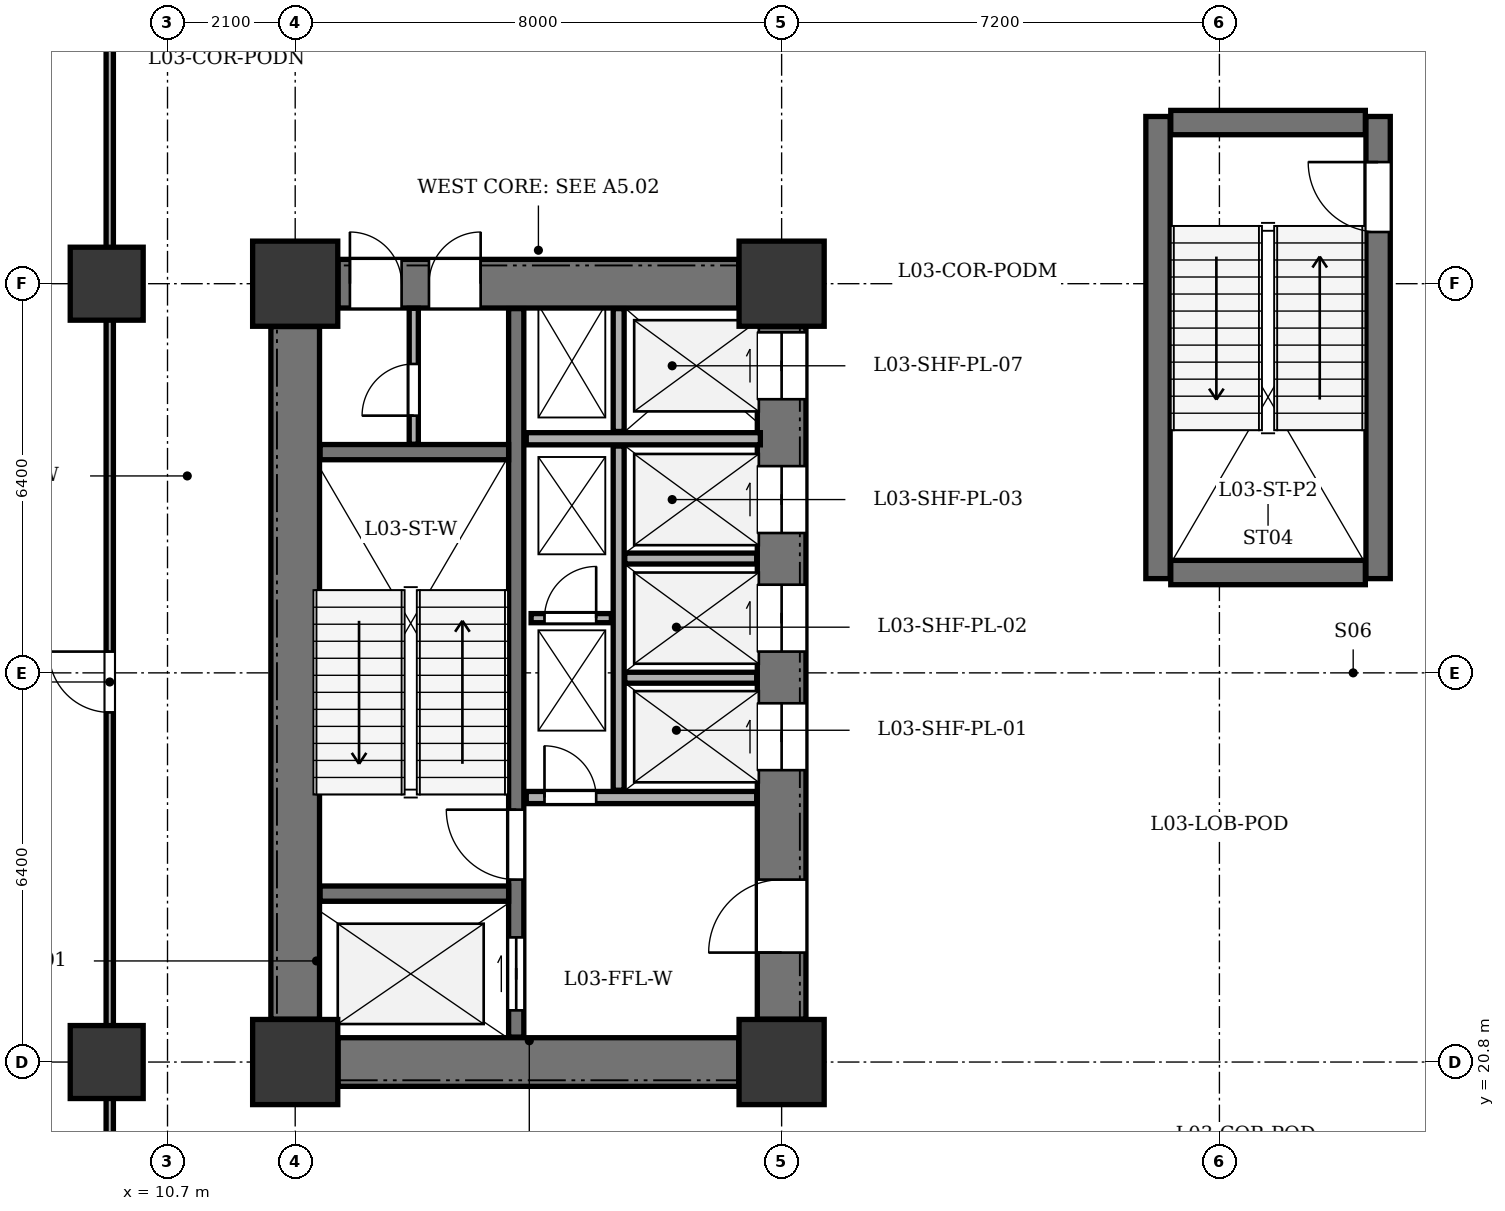
"""IFC4 building model, lengths in metres.
Left out: names, types, materials, properties, quantities, classifications, styles, units other than length and angle.
Written with IfcOpenShell. Run it as: python <this file> out.ifc"""

import sys

from ifc_helpers import new_model, si_unit, direction, frame, frame_2d, origin, origin_2d, place, context, subcontext, project, spatial, rectangle, extrude, element, fill, save


model = new_model("IFC4")
c1 = context("Model", 3, precision=1e-05, world=origin(), true_north=direction((0.0, 1.0)))
c2 = subcontext(c1, "Body", "Model", "MODEL_VIEW")
j1 = project(units=[si_unit("LENGTHUNIT", "METRE"), si_unit("PLANEANGLEUNIT", "RADIAN")], contexts=[c1])
p1 = place(None, origin())
s1 = spatial("IfcSite", under=j1, at=p1, CompositionType="ELEMENT")
p2 = place(p1, origin())
s2 = spatial("IfcBuilding", under=s1, at=p2, CompositionType="ELEMENT")
p3 = place(p2, frame((0.0, 0.0, 14.4)))
s3 = spatial("IfcBuildingStorey", under=s2, at=p3, CompositionType="ELEMENT", Elevation=14.4)
for number, where, z_axis, x_axis in (
    (1, (12.8, 20.8, 0.0), (0.0, 0.0, 1.0), (1.0, 0.0, 0.0)),
    (2, (20.8, 20.8, 0.0), (0.0, 0.0, 1.0), (1.0, 0.0, 0.0)),
    (3, (12.8, 33.6, 0.0), (0.0, 0.0, 1.0), (1.0, 0.0, 0.0)),
    (4, (20.8, 33.6, 0.0), (0.0, 0.0, 1.0), (1.0, 0.0, 0.0)),
):
    element("IfcColumn", number, at=place(p3, frame(where, z_axis=z_axis, x_axis=x_axis)), inside=s3, PredefinedType="COLUMN", context=c2, shape_type="SweptSolid", body=[
        extrude(rectangle(XDim=1.4, YDim=1.4, at=origin_2d()), origin(), (0.0, 0.0, 1.0), 4.5),
    ])
for number, where, z_axis, x_axis in (
    (5, (9.7, 20.8, 0.0), (0.0, 0.0, 1.0), (1.0, 0.0, 0.0)),
    (6, (9.7, 33.6, 0.0), (0.0, 0.0, 1.0), (1.0, 0.0, 0.0)),
):
    element("IfcColumn", number, at=place(p3, frame(where, z_axis=z_axis, x_axis=x_axis)), inside=s3, PredefinedType="COLUMN", context=c2, shape_type="SweptSolid", body=[
        extrude(rectangle(XDim=1.2, YDim=1.2, at=origin_2d()), origin(), (0.0, 0.0, 1.0), 4.5),
    ])
p4 = place(p3, frame((12.8, 21.505, 0.0), z_axis=(0.0, 0.0, 1.0), x_axis=(0.0, 1.0, 0.0)))
e7 = element("IfcWall", 7, at=p4, inside=s3, PredefinedType="SHEAR", context=c2, shape_type="SweptSolid", body=[
    extrude(rectangle(XDim=11.39, YDim=0.8, at=frame_2d((5.695, 0.0))), origin(), (0.0, 0.0, 1.0), 4.0),
])
p5 = place(p3, frame((13.505, 20.8, 0.0), z_axis=(0.0, 0.0, 1.0), x_axis=(1.0, 0.0, 0.0)))
e8 = element("IfcWall", 8, at=p5, inside=s3, PredefinedType="SHEAR", context=c2, shape_type="SweptSolid", body=[
    extrude(rectangle(XDim=6.59, YDim=0.8, at=frame_2d((3.295, 0.0))), origin(), (0.0, 0.0, 1.0), 4.0),
])
p6 = place(p3, frame((13.505, 33.6, 0.0), z_axis=(0.0, 0.0, 1.0), x_axis=(1.0, 0.0, 0.0)))
e9 = element("IfcWall", 9, at=p6, inside=s3, PredefinedType="SHEAR", context=c2, shape_type="SweptSolid", body=[
    extrude(rectangle(XDim=6.59, YDim=0.8, at=frame_2d((3.295, 0.0))), origin(), (0.0, 0.0, 1.0), 4.0),
])
p7 = place(p6, frame((0.195, 0.0, 0.0)))
e10 = element("IfcOpeningElement", 10, at=p7, cuts=e9, PredefinedType="OPENING", context=c2, shape_type="SweptSolid", body=[
    extrude(rectangle(XDim=0.85, YDim=2.02, at=frame_2d((0.425, 1.01))), frame((0.0, 0.41, 0.0), z_axis=(0.0, -1.0, 0.0), x_axis=(1.0, 0.0, 0.0)), (0.0, 0.0, 1.0), 0.82),
])
p8 = place(p6, frame((1.495, 0.0, 0.0)))
e11 = element("IfcOpeningElement", 11, at=p8, cuts=e9, PredefinedType="OPENING", context=c2, shape_type="SweptSolid", body=[
    extrude(rectangle(XDim=0.85, YDim=2.02, at=frame_2d((0.425, 1.01))), frame((0.0, 0.41, 0.0), z_axis=(0.0, -1.0, 0.0), x_axis=(1.0, 0.0, 0.0)), (0.0, 0.0, 1.0), 0.82),
])
p9 = place(p3, frame((20.8, 21.505, 0.0), z_axis=(0.0, 0.0, 1.0), x_axis=(0.0, 1.0, 0.0)))
e12 = element("IfcWall", 12, at=p9, inside=s3, PredefinedType="SHEAR", context=c2, shape_type="SweptSolid", body=[
    extrude(rectangle(XDim=11.39, YDim=0.8, at=frame_2d((5.695, 0.0))), origin(), (0.0, 0.0, 1.0), 4.0),
])
p10 = place(p9, frame((1.095, 0.0, 0.0)))
e13 = element("IfcOpeningElement", 13, at=p10, cuts=e12, PredefinedType="OPENING", context=c2, shape_type="SweptSolid", body=[
    extrude(rectangle(XDim=1.2, YDim=2.15, at=frame_2d((0.6, 1.075))), frame((0.0, 0.41, 0.0), z_axis=(0.0, -1.0, 0.0), x_axis=(1.0, 0.0, 0.0)), (0.0, 0.0, 1.0), 0.82),
])
p11 = place(p9, frame((4.095, 0.0, 0.0)))
e14 = element("IfcOpeningElement", 14, at=p11, cuts=e12, PredefinedType="OPENING", context=c2, shape_type="SweptSolid", body=[
    extrude(rectangle(XDim=1.1, YDim=2.1, at=frame_2d((0.55, 1.05))), frame((0.0, 0.41, 0.0), z_axis=(0.0, -1.0, 0.0), x_axis=(1.0, 0.0, 0.0)), (0.0, 0.0, 1.0), 0.82),
])
p12 = place(p9, frame((6.045, 0.0, 0.0)))
e15 = element("IfcOpeningElement", 15, at=p12, cuts=e12, PredefinedType="OPENING", context=c2, shape_type="SweptSolid", body=[
    extrude(rectangle(XDim=1.1, YDim=2.1, at=frame_2d((0.55, 1.05))), frame((0.0, 0.41, 0.0), z_axis=(0.0, -1.0, 0.0), x_axis=(1.0, 0.0, 0.0)), (0.0, 0.0, 1.0), 0.82),
])
p13 = place(p9, frame((7.995, 0.0, 0.0)))
e16 = element("IfcOpeningElement", 16, at=p13, cuts=e12, PredefinedType="OPENING", context=c2, shape_type="SweptSolid", body=[
    extrude(rectangle(XDim=1.1, YDim=2.1, at=frame_2d((0.55, 1.05))), frame((0.0, 0.41, 0.0), z_axis=(0.0, -1.0, 0.0), x_axis=(1.0, 0.0, 0.0)), (0.0, 0.0, 1.0), 0.82),
])
p14 = place(p9, frame((10.195, 0.0, 0.0)))
e17 = element("IfcOpeningElement", 17, at=p14, cuts=e12, PredefinedType="OPENING", context=c2, shape_type="SweptSolid", body=[
    extrude(rectangle(XDim=1.1, YDim=2.1, at=frame_2d((0.55, 1.05))), frame((0.0, 0.41, 0.0), z_axis=(0.0, -1.0, 0.0), x_axis=(1.0, 0.0, 0.0)), (0.0, 0.0, 1.0), 0.82),
])
p15 = place(p3, frame((16.435, 21.21, 0.0), z_axis=(0.0, 0.0, 1.0), x_axis=(0.0, 1.0, 0.0)))
e18 = element("IfcWall", 18, at=p15, inside=s3, PredefinedType="SHEAR", context=c2, shape_type="SweptSolid", body=[
    extrude(rectangle(XDim=11.98, YDim=0.25, at=frame_2d((5.99, 0.0))), origin(), (0.0, 0.0, 1.0), 4.0),
])
p16 = place(p15, frame((0.44, 0.0, 0.0)))
e19 = element("IfcOpeningElement", 19, at=p16, cuts=e18, PredefinedType="OPENING", context=c2, shape_type="SweptSolid", body=[
    extrude(rectangle(XDim=1.2, YDim=2.15, at=frame_2d((0.6, 1.075))), frame((0.0, 0.135, 0.0), z_axis=(0.0, -1.0, 0.0), x_axis=(1.0, 0.0, 0.0)), (0.0, 0.0, 1.0), 0.27),
])
p17 = place(p15, frame((2.59, 0.0, 0.0)))
e20 = element("IfcOpeningElement", 20, at=p17, cuts=e18, PredefinedType="OPENING", context=c2, shape_type="SweptSolid", body=[
    extrude(rectangle(XDim=1.15, YDim=2.15, at=frame_2d((0.575, 1.075))), frame((0.0, 0.135, 0.0), z_axis=(0.0, -1.0, 0.0), x_axis=(1.0, 0.0, 0.0)), (0.0, 0.0, 1.0), 0.27),
])
for number, where, z_axis, x_axis in (
    (21, (13.21, 23.57, 0.0), (0.0, 0.0, 1.0), (1.0, 0.0, 0.0)),
    (22, (13.21, 30.83, 0.0), (0.0, 0.0, 1.0), (1.0, 0.0, 0.0)),
):
    element("IfcWall", number, at=place(p3, frame(where, z_axis=z_axis, x_axis=x_axis)), inside=s3, PredefinedType="SHEAR", context=c2, shape_type="SweptSolid", body=[
        extrude(rectangle(XDim=3.1, YDim=0.25, at=frame_2d((1.55, 0.0))), origin(), (0.0, 0.0, 1.0), 4.0),
    ])
p18 = place(p3, frame((16.6, 25.15, 0.0), z_axis=(0.0, 0.0, 1.0), x_axis=(1.0, 0.0, 0.0)))
e23 = element("IfcWall", 23, at=p18, inside=s3, PredefinedType="SOLIDWALL", context=c2, shape_type="SweptSolid", body=[
    extrude(rectangle(XDim=3.79, YDim=0.2, at=frame_2d((1.895, 0.0))), origin(), (0.0, 0.0, 1.0), 4.0),
])
p19 = place(p18, frame((0.3, 0.0, 0.0)))
e24 = element("IfcOpeningElement", 24, at=p19, cuts=e23, PredefinedType="OPENING", context=c2, shape_type="SweptSolid", body=[
    extrude(rectangle(XDim=0.85, YDim=2.02, at=frame_2d((0.425, 1.01))), frame((0.0, 0.11, 0.0), z_axis=(0.0, -1.0, 0.0), x_axis=(1.0, 0.0, 0.0)), (0.0, 0.0, 1.0), 0.22),
])
p20 = place(p3, frame((16.6, 31.05, 0.0), z_axis=(0.0, 0.0, 1.0), x_axis=(1.0, 0.0, 0.0)))
e25 = element("IfcWall", 25, at=p20, inside=s3, PredefinedType="SOLIDWALL", context=c2, shape_type="SweptSolid", body=[
    extrude(rectangle(XDim=3.85, YDim=0.2, at=frame_2d((1.925, 0.0))), origin(), (0.0, 0.0, 1.0), 4.0),
])
p21 = place(p3, frame((18.12, 25.27, 0.0), z_axis=(0.0, 0.0, 1.0), x_axis=(0.0, 1.0, 0.0)))
e26 = element("IfcWall", 26, at=p21, inside=s3, PredefinedType="PARTITIONING", context=c2, shape_type="SweptSolid", body=[
    extrude(rectangle(XDim=5.66, YDim=0.18, at=frame_2d((2.83, 0.0))), origin(), (0.0, 0.0, 1.0), 4.0),
])
p22 = place(p3, frame((18.12, 31.17, 0.0), z_axis=(0.0, 0.0, 1.0), x_axis=(0.0, 1.0, 0.0)))
e27 = element("IfcWall", 27, at=p22, inside=s3, PredefinedType="PARTITIONING", context=c2, shape_type="SweptSolid", body=[
    extrude(rectangle(XDim=2.02, YDim=0.18, at=frame_2d((1.01, 0.0))), origin(), (0.0, 0.0, 1.0), 4.0),
])
for number, where, z_axis, x_axis in (
    (28, (18.22, 27.12, 0.0), (0.0, 0.0, 1.0), (1.0, 0.0, 0.0)),
    (29, (18.22, 29.08, 0.0), (0.0, 0.0, 1.0), (1.0, 0.0, 0.0)),
):
    element("IfcWall", number, at=place(p3, frame(where, z_axis=z_axis, x_axis=x_axis)), inside=s3, PredefinedType="PARTITIONING", context=c2, shape_type="SweptSolid", body=[
        extrude(rectangle(XDim=2.17, YDim=0.18, at=frame_2d((1.085, 0.0))), origin(), (0.0, 0.0, 1.0), 4.0),
    ])
p23 = place(p3, frame((26.99, 28.75, 0.0), z_axis=(0.0, 0.0, 1.0), x_axis=(0.0, 1.0, 0.0)))
e30 = element("IfcWall", 30, at=p23, inside=s3, PredefinedType="SHEAR", context=c2, shape_type="SweptSolid", body=[
    extrude(rectangle(XDim=7.6, YDim=0.4, at=frame_2d((3.8, 0.0))), origin(), (0.0, 0.0, 1.0), 4.0),
])
p24 = place(p3, frame((30.61, 28.75, 0.0), z_axis=(0.0, 0.0, 1.0), x_axis=(0.0, 1.0, 0.0)))
e31 = element("IfcWall", 31, at=p24, inside=s3, PredefinedType="SHEAR", context=c2, shape_type="SweptSolid", body=[
    extrude(rectangle(XDim=7.6, YDim=0.4, at=frame_2d((3.8, 0.0))), origin(), (0.0, 0.0, 1.0), 4.0),
])
p25 = place(p24, frame((5.7, 0.0, 0.0)))
e32 = element("IfcOpeningElement", 32, at=p25, cuts=e31, PredefinedType="OPENING", context=c2, shape_type="SweptSolid", body=[
    extrude(rectangle(XDim=1.15, YDim=2.15, at=frame_2d((0.575, 1.075))), frame((0.0, 0.21, 0.0), z_axis=(0.0, -1.0, 0.0), x_axis=(1.0, 0.0, 0.0)), (0.0, 0.0, 1.0), 0.42),
])
for number, where, z_axis, x_axis in (
    (33, (27.2, 28.85, 0.0), (0.0, 0.0, 1.0), (1.0, 0.0, 0.0)),
    (34, (27.2, 36.25, 0.0), (0.0, 0.0, 1.0), (1.0, 0.0, 0.0)),
):
    element("IfcWall", number, at=place(p3, frame(where, z_axis=z_axis, x_axis=x_axis)), inside=s3, PredefinedType="SHEAR", context=c2, shape_type="SweptSolid", body=[
        extrude(rectangle(XDim=3.2, YDim=0.4, at=frame_2d((1.6, 0.0))), origin(), (0.0, 0.0, 1.0), 4.0),
    ])
p26 = place(p3, frame((14.75, 30.96, 0.0), z_axis=(0.0, 0.0, 1.0), x_axis=(0.0, 1.0, 0.0)))
e35 = element("IfcWall", 35, at=p26, inside=s3, PredefinedType="PARTITIONING", context=c2, shape_type="SweptSolid", body=[
    extrude(rectangle(XDim=2.235, YDim=0.15, at=frame_2d((1.118, 0.0))), origin(), (0.0, 0.0, 1.0), 4.0),
])
p27 = place(p26, frame((0.47, 0.0, 0.0)))
e36 = element("IfcOpeningElement", 36, at=p27, cuts=e35, PredefinedType="OPENING", context=c2, shape_type="SweptSolid", body=[
    extrude(rectangle(XDim=0.85, YDim=2.02, at=frame_2d((0.425, 1.01))), frame((0.0, 0.085, 0.0), z_axis=(0.0, -1.0, 0.0), x_axis=(1.0, 0.0, 0.0)), (0.0, 0.0, 1.0), 0.17),
])
p28 = place(p3, frame((16.68, 28.1, 0.0), z_axis=(0.0, 0.0, 1.0), x_axis=(1.0, 0.0, 0.0)))
e37 = element("IfcWall", 37, at=p28, inside=s3, PredefinedType="PARTITIONING", context=c2, shape_type="SweptSolid", body=[
    extrude(rectangle(XDim=1.32, YDim=0.15, at=frame_2d((0.66, 0.0))), origin(), (0.0, 0.0, 1.0), 4.0),
])
p29 = place(p28, frame((0.22, 0.0, 0.0)))
e38 = element("IfcOpeningElement", 38, at=p29, cuts=e37, PredefinedType="OPENING", context=c2, shape_type="SweptSolid", body=[
    extrude(rectangle(XDim=0.85, YDim=2.02, at=frame_2d((0.425, 1.01))), frame((0.0, 0.085, 0.0), z_axis=(0.0, -1.0, 0.0), x_axis=(1.0, 0.0, 0.0)), (0.0, 0.0, 1.0), 0.17),
])
p30 = place(p3, frame((9.75, 18.565, 0.0), z_axis=(0.0, 0.0, 1.0), x_axis=(0.0, 1.0, 0.0)))
e39 = element("IfcWall", 39, at=p30, inside=s3, PredefinedType="PARTITIONING", context=c2, shape_type="SweptSolid", body=[
    extrude(rectangle(XDim=19.72, YDim=0.12, at=frame_2d((9.86, 0.0))), origin(), (0.0, 0.0, 1.0), 2.185),
])
p31 = place(p30, frame((7.985, 0.0, 0.0)))
e40 = element("IfcOpeningElement", 40, at=p31, cuts=e39, PredefinedType="OPENING", context=c2, shape_type="SweptSolid", body=[
    extrude(rectangle(XDim=1.0, YDim=2.1, at=frame_2d((0.5, 1.05))), frame((0.0, 0.07, 0.0), z_axis=(0.0, -1.0, 0.0), x_axis=(1.0, 0.0, 0.0)), (0.0, 0.0, 1.0), 0.14),
])
p32 = place(p7, origin())
e41 = element("IfcDoor", 41, at=p32, inside=s3, OperationType="SINGLE_SWING_LEFT", PredefinedType="DOOR", context=c2, shape_type="SweptSolid", body=[
    extrude(rectangle(XDim=0.85, YDim=2.02, at=frame_2d((0.425, 1.01))), frame((0.0, 0.025, 0.0), z_axis=(0.0, -1.0, 0.0), x_axis=(1.0, 0.0, 0.0)), (0.0, 0.0, 1.0), 0.05),
])
fill(e10, e41)
p33 = place(p8, origin())
e42 = element("IfcDoor", 42, at=p33, inside=s3, OperationType="SINGLE_SWING_RIGHT", PredefinedType="DOOR", context=c2, shape_type="SweptSolid", body=[
    extrude(rectangle(XDim=0.85, YDim=2.02, at=frame_2d((0.425, 1.01))), frame((0.0, 0.025, 0.0), z_axis=(0.0, -1.0, 0.0), x_axis=(1.0, 0.0, 0.0)), (0.0, 0.0, 1.0), 0.05),
])
fill(e11, e42)
p34 = place(p10, origin())
e43 = element("IfcDoor", 43, at=p34, inside=s3, OperationType="SINGLE_SWING_LEFT", PredefinedType="DOOR", context=c2, shape_type="SweptSolid", body=[
    extrude(rectangle(XDim=1.2, YDim=2.15, at=frame_2d((0.6, 1.075))), frame((0.0, 0.025, 0.0), z_axis=(0.0, -1.0, 0.0), x_axis=(1.0, 0.0, 0.0)), (0.0, 0.0, 1.0), 0.05),
])
fill(e13, e43)
p35 = place(p11, origin())
e44 = element("IfcDoor", 44, at=p35, inside=s3, OperationType="DOUBLE_DOOR_SLIDING", PredefinedType="DOOR", context=c2, shape_type="SweptSolid", body=[
    extrude(rectangle(XDim=1.1, YDim=2.1, at=frame_2d((0.55, 1.05))), frame((0.0, 0.025, 0.0), z_axis=(0.0, -1.0, 0.0), x_axis=(1.0, 0.0, 0.0)), (0.0, 0.0, 1.0), 0.05),
])
fill(e14, e44)
p36 = place(p12, origin())
e45 = element("IfcDoor", 45, at=p36, inside=s3, OperationType="DOUBLE_DOOR_SLIDING", PredefinedType="DOOR", context=c2, shape_type="SweptSolid", body=[
    extrude(rectangle(XDim=1.1, YDim=2.1, at=frame_2d((0.55, 1.05))), frame((0.0, 0.025, 0.0), z_axis=(0.0, -1.0, 0.0), x_axis=(1.0, 0.0, 0.0)), (0.0, 0.0, 1.0), 0.05),
])
fill(e15, e45)
p37 = place(p13, origin())
e46 = element("IfcDoor", 46, at=p37, inside=s3, OperationType="DOUBLE_DOOR_SLIDING", PredefinedType="DOOR", context=c2, shape_type="SweptSolid", body=[
    extrude(rectangle(XDim=1.1, YDim=2.1, at=frame_2d((0.55, 1.05))), frame((0.0, 0.025, 0.0), z_axis=(0.0, -1.0, 0.0), x_axis=(1.0, 0.0, 0.0)), (0.0, 0.0, 1.0), 0.05),
])
fill(e16, e46)
p38 = place(p14, origin())
e47 = element("IfcDoor", 47, at=p38, inside=s3, OperationType="DOUBLE_DOOR_SLIDING", PredefinedType="DOOR", context=c2, shape_type="SweptSolid", body=[
    extrude(rectangle(XDim=1.1, YDim=2.1, at=frame_2d((0.55, 1.05))), frame((0.0, 0.025, 0.0), z_axis=(0.0, -1.0, 0.0), x_axis=(1.0, 0.0, 0.0)), (0.0, 0.0, 1.0), 0.05),
])
fill(e17, e47)
p39 = place(p16, origin())
e48 = element("IfcDoor", 48, at=p39, inside=s3, OperationType="DOUBLE_DOOR_SLIDING", PredefinedType="DOOR", context=c2, shape_type="SweptSolid", body=[
    extrude(rectangle(XDim=1.2, YDim=2.15, at=frame_2d((0.6, 1.075))), frame((0.0, 0.025, 0.0), z_axis=(0.0, -1.0, 0.0), x_axis=(1.0, 0.0, 0.0)), (0.0, 0.0, 1.0), 0.05),
])
fill(e19, e48)
p40 = place(p17, origin())
e49 = element("IfcDoor", 49, at=p40, inside=s3, OperationType="SINGLE_SWING_RIGHT", PredefinedType="DOOR", context=c2, shape_type="SweptSolid", body=[
    extrude(rectangle(XDim=1.15, YDim=2.15, at=frame_2d((0.575, 1.075))), frame((0.0, 0.025, 0.0), z_axis=(0.0, -1.0, 0.0), x_axis=(1.0, 0.0, 0.0)), (0.0, 0.0, 1.0), 0.05),
])
fill(e20, e49)
p41 = place(p19, origin())
e50 = element("IfcDoor", 50, at=p41, inside=s3, OperationType="SINGLE_SWING_LEFT", PredefinedType="DOOR", context=c2, shape_type="SweptSolid", body=[
    extrude(rectangle(XDim=0.85, YDim=2.02, at=frame_2d((0.425, 1.01))), frame((0.0, 0.025, 0.0), z_axis=(0.0, -1.0, 0.0), x_axis=(1.0, 0.0, 0.0)), (0.0, 0.0, 1.0), 0.05),
])
fill(e24, e50)
p42 = place(p25, origin())
e51 = element("IfcDoor", 51, at=p42, inside=s3, OperationType="SINGLE_SWING_RIGHT", PredefinedType="DOOR", context=c2, shape_type="SweptSolid", body=[
    extrude(rectangle(XDim=1.15, YDim=2.15, at=frame_2d((0.575, 1.075))), frame((0.0, 0.025, 0.0), z_axis=(0.0, -1.0, 0.0), x_axis=(1.0, 0.0, 0.0)), (0.0, 0.0, 1.0), 0.05),
])
fill(e32, e51)
p43 = place(p27, origin())
e52 = element("IfcDoor", 52, at=p43, inside=s3, OperationType="SINGLE_SWING_LEFT", PredefinedType="DOOR", context=c2, shape_type="SweptSolid", body=[
    extrude(rectangle(XDim=0.85, YDim=2.02, at=frame_2d((0.425, 1.01))), frame((0.0, 0.025, 0.0), z_axis=(0.0, -1.0, 0.0), x_axis=(1.0, 0.0, 0.0)), (0.0, 0.0, 1.0), 0.05),
])
fill(e36, e52)
p44 = place(p29, origin())
e53 = element("IfcDoor", 53, at=p44, inside=s3, OperationType="SINGLE_SWING_RIGHT", PredefinedType="DOOR", context=c2, shape_type="SweptSolid", body=[
    extrude(rectangle(XDim=0.85, YDim=2.02, at=frame_2d((0.425, 1.01))), frame((0.0, 0.025, 0.0), z_axis=(0.0, -1.0, 0.0), x_axis=(1.0, 0.0, 0.0)), (0.0, 0.0, 1.0), 0.05),
])
fill(e38, e53)
p45 = place(p31, origin())
e54 = element("IfcDoor", 54, at=p45, inside=s3, OperationType="SINGLE_SWING_RIGHT", PredefinedType="DOOR", context=c2, shape_type="SweptSolid", body=[
    extrude(rectangle(XDim=1.0, YDim=2.1, at=frame_2d((0.5, 1.05))), frame((0.0, 0.025, 0.0), z_axis=(0.0, -1.0, 0.0), x_axis=(1.0, 0.0, 0.0)), (0.0, 0.0, 1.0), 0.05),
])
fill(e40, e54)
save(model, sys.argv[1])
